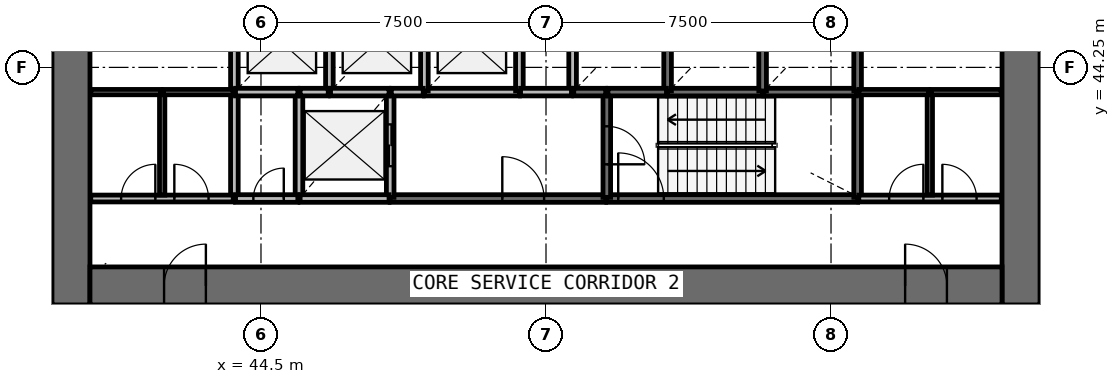
"""IFC4 building model, lengths in metres.
Left out: names, types, materials, properties, quantities, classifications, styles, units other than length and angle.
Written with IfcOpenShell. Run it as: python <this file> out.ifc"""

import sys

from ifc_helpers import new_model, si_unit, direction, frame, frame_2d, origin, place, context, subcontext, project, spatial, rectangle, extrude, source, transform, mapped, element, fill, save


model = new_model("IFC4")
c1 = context("Model", 3, precision=1e-05, world=origin(), true_north=direction((0.0, 1.0)))
c2 = subcontext(c1, "Body", "Model", "MODEL_VIEW")
j1 = project(units=[si_unit("LENGTHUNIT", "METRE"), si_unit("PLANEANGLEUNIT", "RADIAN")], contexts=[c1])
p1 = place(None, origin())
s1 = spatial("IfcSite", under=j1, at=p1, CompositionType="ELEMENT")
p2 = place(p1, origin())
s2 = spatial("IfcBuilding", under=s1, at=p2, CompositionType="ELEMENT")
p3 = place(p2, frame((0.0, 0.0, 62.2)))
s3 = spatial("IfcBuildingStorey", under=s2, at=p3, CompositionType="ELEMENT", Elevation=62.2)
p4 = place(p3, frame((64.5, 38.0, 0.0), z_axis=(0.0, 0.0, 1.0), x_axis=(0.0, 1.0, 0.0)))
e1 = element("IfcWall", 1, at=p4, inside=s3, PredefinedType="SHEAR", context=c2, shape_type="SweptSolid", body=[
    extrude(rectangle(XDim=20.0, YDim=1.0, at=frame_2d((10.0, 0.0))), origin(), (0.0, 0.0, 1.0), 4.4),
])
p5 = place(p4, frame((9.1, 0.0, 0.0)))
e2 = element("IfcOpeningElement", 2, at=p5, cuts=e1, PredefinedType="OPENING", context=c2, shape_type="SweptSolid", body=[
    extrude(rectangle(XDim=1.8, YDim=2.1, at=frame_2d((0.9, 1.05))), frame((0.0, 0.51, 0.0), z_axis=(0.0, -1.0, 0.0), x_axis=(1.0, 0.0, 0.0)), (0.0, 0.0, 1.0), 1.02),
])
p6 = place(p3, frame((39.5, 58.0, 0.0), z_axis=(0.0, 0.0, 1.0), x_axis=(0.0, -1.0, 0.0)))
e3 = element("IfcWall", 3, at=p6, inside=s3, PredefinedType="SHEAR", context=c2, shape_type="SweptSolid", body=[
    extrude(rectangle(XDim=20.0, YDim=1.0, at=frame_2d((10.0, 0.0))), origin(), (0.0, 0.0, 1.0), 4.4),
])
p7 = place(p6, frame((9.1, 0.0, 0.0)))
e4 = element("IfcOpeningElement", 4, at=p7, cuts=e3, PredefinedType="OPENING", context=c2, shape_type="SweptSolid", body=[
    extrude(rectangle(XDim=1.8, YDim=2.1, at=frame_2d((0.9, 1.05))), frame((0.0, 0.51, 0.0), z_axis=(0.0, -1.0, 0.0), x_axis=(1.0, 0.0, 0.0)), (0.0, 0.0, 1.0), 1.02),
])
p8 = place(p3, frame((40.0, 38.5, 0.0), z_axis=(0.0, 0.0, 1.0), x_axis=(1.0, 0.0, 0.0)))
e5 = element("IfcWall", 5, at=p8, inside=s3, PredefinedType="SHEAR", context=c2, shape_type="SweptSolid", body=[
    extrude(rectangle(XDim=24.0, YDim=1.0, at=frame_2d((12.0, 0.0))), origin(), (0.0, 0.0, 1.0), 4.4),
])
p9 = place(p8, frame((21.45, 0.0, 0.0)))
e6 = element("IfcOpeningElement", 6, at=p9, cuts=e5, PredefinedType="OPENING", context=c2, shape_type="SweptSolid", body=[
    extrude(rectangle(XDim=1.1, YDim=2.1, at=frame_2d((0.55, 1.05))), frame((0.0, 0.51, 0.0), z_axis=(0.0, -1.0, 0.0), x_axis=(1.0, 0.0, 0.0)), (0.0, 0.0, 1.0), 1.02),
])
p10 = place(p8, frame((1.95, 0.0, 0.0)))
e7 = element("IfcOpeningElement", 7, at=p10, cuts=e5, PredefinedType="OPENING", context=c2, shape_type="SweptSolid", body=[
    extrude(rectangle(XDim=1.1, YDim=2.1, at=frame_2d((0.55, 1.05))), frame((0.0, 0.51, 0.0), z_axis=(0.0, -1.0, 0.0), x_axis=(1.0, 0.0, 0.0)), (0.0, 0.0, 1.0), 1.02),
])
p11 = place(p3, frame((53.6, 40.8, 0.0), z_axis=(0.0, 0.0, 1.0), x_axis=(1.0, 0.0, 0.0)))
e8 = element("IfcWall", 8, at=p11, inside=s3, PredefinedType="SOLIDWALL", context=c2, shape_type="SweptSolid", body=[
    extrude(rectangle(XDim=6.6, YDim=0.2, at=frame_2d((3.3, 0.0))), origin(), (0.0, 0.0, 1.0), 3.95),
])
p12 = place(p11, frame((0.3, 0.0, 0.0)))
e9 = element("IfcOpeningElement", 9, at=p12, cuts=e8, PredefinedType="OPENING", context=c2, shape_type="SweptSolid", body=[
    extrude(rectangle(XDim=1.2, YDim=2.1, at=frame_2d((0.6, 1.05))), frame((0.0, 0.11, 0.0), z_axis=(0.0, -1.0, 0.0), x_axis=(1.0, 0.0, 0.0)), (0.0, 0.0, 1.0), 0.22),
])
p13 = place(p3, frame((47.9, 40.8, 0.0), z_axis=(0.0, 0.0, 1.0), x_axis=(1.0, 0.0, 0.0)))
e10 = element("IfcWall", 10, at=p13, inside=s3, PredefinedType="SOLIDWALL", context=c2, shape_type="SweptSolid", body=[
    extrude(rectangle(XDim=5.67, YDim=0.2, at=frame_2d((2.835, 0.0))), origin(), (0.0, 0.0, 1.0), 3.95),
])
p14 = place(p13, frame((2.95, 0.0, 0.0)))
e11 = element("IfcOpeningElement", 11, at=p14, cuts=e10, PredefinedType="OPENING", context=c2, shape_type="SweptSolid", body=[
    extrude(rectangle(XDim=1.1, YDim=2.1, at=frame_2d((0.55, 1.05))), frame((0.0, 0.11, 0.0), z_axis=(0.0, -1.0, 0.0), x_axis=(1.0, 0.0, 0.0)), (0.0, 0.0, 1.0), 0.22),
])
for number, where, z_axis, x_axis in (
    (12, (43.8, 43.6, 0.0), (0.0, 0.0, 1.0), (0.0, -1.0, 0.0)),
    (13, (45.5, 43.6, 0.0), (0.0, 0.0, 1.0), (0.0, -1.0, 0.0)),
):
    element("IfcWall", number, at=place(p3, frame(where, z_axis=z_axis, x_axis=x_axis)), inside=s3, PredefinedType="SOLIDWALL", context=c2, shape_type="SweptSolid", body=[
        extrude(rectangle(XDim=2.8, YDim=0.2, at=frame_2d((1.4, 0.0))), origin(), (0.0, 0.0, 1.0), 3.95),
    ])
p15 = place(p3, frame((47.9, 40.83, 0.0), z_axis=(0.0, 0.0, 1.0), x_axis=(0.0, 1.0, 0.0)))
e14 = element("IfcWall", 14, at=p15, inside=s3, PredefinedType="SOLIDWALL", context=c2, shape_type="SweptSolid", body=[
    extrude(rectangle(XDim=2.77, YDim=0.2, at=frame_2d((1.385, 0.0))), origin(), (0.0, 0.0, 1.0), 3.95),
])
p16 = place(p15, frame((0.82, 0.0, 0.0)))
e15 = element("IfcOpeningElement", 15, at=p16, cuts=e14, PredefinedType="OPENING", context=c2, shape_type="SweptSolid", body=[
    extrude(rectangle(XDim=1.1, YDim=2.1, at=frame_2d((0.55, 1.05))), frame((0.0, 0.11, 0.0), z_axis=(0.0, -1.0, 0.0), x_axis=(1.0, 0.0, 0.0)), (0.0, 0.0, 1.0), 0.22),
])
p17 = place(p3, frame((60.2, 40.83, 0.0), z_axis=(0.0, 0.0, 1.0), x_axis=(0.0, 1.0, 0.0)))
e16 = element("IfcWall", 16, at=p17, inside=s3, PredefinedType="SOLIDWALL", context=c2, shape_type="SweptSolid", body=[
    extrude(rectangle(XDim=2.77, YDim=0.2, at=frame_2d((1.385, 0.0))), origin(), (0.0, 0.0, 1.0), 3.95),
])
p18 = place(p3, frame((53.6, 43.6, 0.0), z_axis=(0.0, 0.0, 1.0), x_axis=(0.0, -1.0, 0.0)))
e17 = element("IfcWall", 17, at=p18, inside=s3, PredefinedType="SOLIDWALL", context=c2, shape_type="SweptSolid", body=[
    extrude(rectangle(XDim=2.77, YDim=0.2, at=frame_2d((1.385, 0.0))), origin(), (0.0, 0.0, 1.0), 3.95),
])
p19 = place(p18, frame((0.9, 0.0, 0.0)))
e18 = element("IfcOpeningElement", 18, at=p19, cuts=e17, PredefinedType="OPENING", context=c2, shape_type="SweptSolid", body=[
    extrude(rectangle(XDim=1.0, YDim=2.1, at=frame_2d((0.5, 1.05))), frame((0.0, 0.11, 0.0), z_axis=(0.0, -1.0, 0.0), x_axis=(1.0, 0.0, 0.0)), (0.0, 0.0, 1.0), 0.22),
])
for number, where, z_axis, x_axis in (
    (19, (48.8, 43.6, 0.0), (0.0, 0.0, 1.0), (1.0, 0.0, 0.0)),
    (20, (55.2, 43.6, 0.0), (0.0, 0.0, 1.0), (1.0, 0.0, 0.0)),
):
    element("IfcWall", number, at=place(p3, frame(where, z_axis=z_axis, x_axis=x_axis)), inside=s3, PredefinedType="SOLIDWALL", context=c2, shape_type="SweptSolid", body=[
        extrude(rectangle(XDim=2.5, YDim=0.2, at=frame_2d((1.25, 0.0))), origin(), (0.0, 0.0, 1.0), 3.95),
    ])
p20 = place(p3, frame((57.73, 43.6, 0.0), z_axis=(0.0, 0.0, 1.0), x_axis=(1.0, 0.0, 0.0)))
e21 = element("IfcWall", 21, at=p20, inside=s3, PredefinedType="SOLIDWALL", context=c2, shape_type="SweptSolid", body=[
    extrude(rectangle(XDim=2.44, YDim=0.2, at=frame_2d((1.22, 0.0))), origin(), (0.0, 0.0, 1.0), 3.95),
])
p21 = place(p3, frame((45.53, 40.8, 0.0), z_axis=(0.0, 0.0, 1.0), x_axis=(1.0, 0.0, 0.0)))
e22 = element("IfcWall", 22, at=p21, inside=s3, PredefinedType="SOLIDWALL", context=c2, shape_type="SweptSolid", body=[
    extrude(rectangle(XDim=2.34, YDim=0.2, at=frame_2d((1.17, 0.0))), origin(), (0.0, 0.0, 1.0), 3.95),
])
p22 = place(p3, frame((43.8, 45.99, 0.0), z_axis=(0.0, 0.0, 1.0), x_axis=(0.0, -1.0, 0.0)))
e23 = element("IfcWall", 23, at=p22, inside=s3, PredefinedType="SOLIDWALL", context=c2, shape_type="SweptSolid", body=[
    extrude(rectangle(XDim=2.36, YDim=0.2, at=frame_2d((1.18, 0.0))), origin(), (0.0, 0.0, 1.0), 3.95),
])
p23 = place(p3, frame((46.3, 43.6, 0.0), z_axis=(0.0, 0.0, 1.0), x_axis=(0.0, 1.0, 0.0)))
e24 = element("IfcWall", 24, at=p23, inside=s3, PredefinedType="SOLIDWALL", context=c2, shape_type="SweptSolid", body=[
    extrude(rectangle(XDim=2.39, YDim=0.2, at=frame_2d((1.195, 0.0))), origin(), (0.0, 0.0, 1.0), 3.95),
])
for number, where, z_axis, x_axis in (
    (25, (48.8, 43.63, 0.0), (0.0, 0.0, 1.0), (0.0, 1.0, 0.0)),
    (26, (51.3, 43.63, 0.0), (0.0, 0.0, 1.0), (0.0, 1.0, 0.0)),
):
    element("IfcWall", number, at=place(p3, frame(where, z_axis=z_axis, x_axis=x_axis)), inside=s3, PredefinedType="SOLIDWALL", context=c2, shape_type="SweptSolid", body=[
        extrude(rectangle(XDim=2.36, YDim=0.2, at=frame_2d((1.18, 0.0))), origin(), (0.0, 0.0, 1.0), 3.95),
    ])
p24 = place(p3, frame((52.7, 45.99, 0.0), z_axis=(0.0, 0.0, 1.0), x_axis=(0.0, -1.0, 0.0)))
e27 = element("IfcWall", 27, at=p24, inside=s3, PredefinedType="SOLIDWALL", context=c2, shape_type="SweptSolid", body=[
    extrude(rectangle(XDim=2.39, YDim=0.2, at=frame_2d((1.195, 0.0))), origin(), (0.0, 0.0, 1.0), 3.95),
])
for number, where, z_axis, x_axis in (
    (28, (55.2, 43.63, 0.0), (0.0, 0.0, 1.0), (0.0, 1.0, 0.0)),
    (29, (57.7, 43.63, 0.0), (0.0, 0.0, 1.0), (0.0, 1.0, 0.0)),
    (30, (60.2, 43.63, 0.0), (0.0, 0.0, 1.0), (0.0, 1.0, 0.0)),
):
    element("IfcWall", number, at=place(p3, frame(where, z_axis=z_axis, x_axis=x_axis)), inside=s3, PredefinedType="SOLIDWALL", context=c2, shape_type="SweptSolid", body=[
        extrude(rectangle(XDim=2.36, YDim=0.2, at=frame_2d((1.18, 0.0))), origin(), (0.0, 0.0, 1.0), 3.95),
    ])
p25 = place(p3, frame((43.83, 43.6, 0.0), z_axis=(0.0, 0.0, 1.0), x_axis=(1.0, 0.0, 0.0)))
e31 = element("IfcWall", 31, at=p25, inside=s3, PredefinedType="SOLIDWALL", context=c2, shape_type="SweptSolid", body=[
    extrude(rectangle(XDim=1.64, YDim=0.2, at=frame_2d((0.82, 0.0))), origin(), (0.0, 0.0, 1.0), 3.95),
])
p26 = place(p3, frame((43.83, 40.8, 0.0), z_axis=(0.0, 0.0, 1.0), x_axis=(1.0, 0.0, 0.0)))
e32 = element("IfcWall", 32, at=p26, inside=s3, PredefinedType="SOLIDWALL", context=c2, shape_type="SweptSolid", body=[
    extrude(rectangle(XDim=1.64, YDim=0.2, at=frame_2d((0.82, 0.0))), origin(), (0.0, 0.0, 1.0), 3.95),
])
p27 = place(p26, frame((0.47, 0.0, 0.0)))
e33 = element("IfcOpeningElement", 33, at=p27, cuts=e32, PredefinedType="OPENING", context=c2, shape_type="SweptSolid", body=[
    extrude(rectangle(XDim=0.8, YDim=2.1, at=frame_2d((0.4, 1.05))), frame((0.0, 0.11, 0.0), z_axis=(0.0, -1.0, 0.0), x_axis=(1.0, 0.0, 0.0)), (0.0, 0.0, 1.0), 0.22),
])
for number, where, z_axis, x_axis in (
    (34, (46.33, 43.6, 0.0), (0.0, 0.0, 1.0), (1.0, 0.0, 0.0)),
    (35, (53.63, 43.6, 0.0), (0.0, 0.0, 1.0), (1.0, 0.0, 0.0)),
):
    element("IfcWall", number, at=place(p3, frame(where, z_axis=z_axis, x_axis=x_axis)), inside=s3, PredefinedType="SOLIDWALL", context=c2, shape_type="SweptSolid", body=[
        extrude(rectangle(XDim=1.54, YDim=0.2, at=frame_2d((0.77, 0.0))), origin(), (0.0, 0.0, 1.0), 3.95),
    ])
p28 = place(p3, frame((52.67, 43.6, 0.0), z_axis=(0.0, 0.0, 1.0), x_axis=(-1.0, 0.0, 0.0)))
e36 = element("IfcWall", 36, at=p28, inside=s3, PredefinedType="SOLIDWALL", context=c2, shape_type="SweptSolid", body=[
    extrude(rectangle(XDim=1.34, YDim=0.2, at=frame_2d((0.67, 0.0))), origin(), (0.0, 0.0, 1.0), 3.95),
])
for number, where, z_axis, x_axis in (
    (37, (47.93, 43.6, 0.0), (0.0, 0.0, 1.0), (1.0, 0.0, 0.0)),
    (38, (52.73, 43.6, 0.0), (0.0, 0.0, 1.0), (1.0, 0.0, 0.0)),
):
    element("IfcWall", number, at=place(p3, frame(where, z_axis=z_axis, x_axis=x_axis)), inside=s3, PredefinedType="SOLIDWALL", context=c2, shape_type="SweptSolid", body=[
        extrude(rectangle(XDim=0.84, YDim=0.2, at=frame_2d((0.42, 0.0))), origin(), (0.0, 0.0, 1.0), 3.95),
    ])
p29 = place(p3, frame((45.53, 43.6, 0.0), z_axis=(0.0, 0.0, 1.0), x_axis=(1.0, 0.0, 0.0)))
e39 = element("IfcWall", 39, at=p29, inside=s3, PredefinedType="SOLIDWALL", context=c2, shape_type="SweptSolid", body=[
    extrude(rectangle(XDim=0.74, YDim=0.2, at=frame_2d((0.37, 0.0))), origin(), (0.0, 0.0, 1.0), 3.95),
])
p30 = place(p3, frame((40.02, 40.8, 0.0), z_axis=(0.0, 0.0, 1.0), x_axis=(1.0, 0.0, 0.0)))
e40 = element("IfcWall", 40, at=p30, inside=s3, PredefinedType="PARTITIONING", context=c2, shape_type="SweptSolid", body=[
    extrude(rectangle(XDim=3.75, YDim=0.18, at=frame_2d((1.875, 0.0))), origin(), (0.0, 0.0, 1.0), 3.95),
])
p31 = place(p30, frame((0.8, 0.0, 0.0)))
e41 = element("IfcOpeningElement", 41, at=p31, cuts=e40, PredefinedType="OPENING", context=c2, shape_type="SweptSolid", body=[
    extrude(rectangle(XDim=0.9, YDim=2.1, at=frame_2d((0.45, 1.05))), frame((0.0, 0.1, 0.0), z_axis=(0.0, -1.0, 0.0), x_axis=(1.0, 0.0, 0.0)), (0.0, 0.0, 1.0), 0.2),
])
p32 = place(p30, frame((2.2, 0.0, 0.0)))
e42 = element("IfcOpeningElement", 42, at=p32, cuts=e40, PredefinedType="OPENING", context=c2, shape_type="SweptSolid", body=[
    extrude(rectangle(XDim=0.9, YDim=2.1, at=frame_2d((0.45, 1.05))), frame((0.0, 0.1, 0.0), z_axis=(0.0, -1.0, 0.0), x_axis=(1.0, 0.0, 0.0)), (0.0, 0.0, 1.0), 0.2),
])
p33 = place(p3, frame((60.23, 40.8, 0.0), z_axis=(0.0, 0.0, 1.0), x_axis=(1.0, 0.0, 0.0)))
e43 = element("IfcWall", 43, at=p33, inside=s3, PredefinedType="PARTITIONING", context=c2, shape_type="SweptSolid", body=[
    extrude(rectangle(XDim=3.75, YDim=0.18, at=frame_2d((1.875, 0.0))), origin(), (0.0, 0.0, 1.0), 3.95),
])
p34 = place(p33, frame((0.8, 0.0, 0.0)))
e44 = element("IfcOpeningElement", 44, at=p34, cuts=e43, PredefinedType="OPENING", context=c2, shape_type="SweptSolid", body=[
    extrude(rectangle(XDim=0.9, YDim=2.1, at=frame_2d((0.45, 1.05))), frame((0.0, 0.1, 0.0), z_axis=(0.0, -1.0, 0.0), x_axis=(1.0, 0.0, 0.0)), (0.0, 0.0, 1.0), 0.2),
])
p35 = place(p33, frame((2.2, 0.0, 0.0)))
e45 = element("IfcOpeningElement", 45, at=p35, cuts=e43, PredefinedType="OPENING", context=c2, shape_type="SweptSolid", body=[
    extrude(rectangle(XDim=0.9, YDim=2.1, at=frame_2d((0.45, 1.05))), frame((0.0, 0.1, 0.0), z_axis=(0.0, -1.0, 0.0), x_axis=(1.0, 0.0, 0.0)), (0.0, 0.0, 1.0), 0.2),
])
for number, where, z_axis, x_axis in (
    (46, (41.9, 40.89, 0.0), (0.0, 0.0, 1.0), (0.0, 1.0, 0.0)),
    (47, (62.1, 40.89, 0.0), (0.0, 0.0, 1.0), (0.0, 1.0, 0.0)),
):
    element("IfcWall", number, at=place(p3, frame(where, z_axis=z_axis, x_axis=x_axis)), inside=s3, PredefinedType="PARTITIONING", context=c2, shape_type="SweptSolid", body=[
        extrude(rectangle(XDim=2.71, YDim=0.14, at=frame_2d((1.355, 0.0))), origin(), (0.0, 0.0, 1.0), 3.05),
    ])
for number, where, z_axis, x_axis in (
    (48, (43.77, 43.6, 0.0), (0.0, 0.0, 1.0), (-1.0, 0.0, 0.0)),
    (49, (60.23, 43.6, 0.0), (0.0, 0.0, 1.0), (1.0, 0.0, 0.0)),
):
    element("IfcWall", number, at=place(p3, frame(where, z_axis=z_axis, x_axis=x_axis)), inside=s3, PredefinedType="PARTITIONING", context=c2, shape_type="SweptSolid", body=[
        extrude(rectangle(XDim=1.84, YDim=0.14, at=frame_2d((0.92, 0.0))), origin(), (0.0, 0.0, 1.0), 3.05),
    ])
for number, where, z_axis, x_axis in (
    (50, (41.87, 43.6, 0.0), (0.0, 0.0, 1.0), (-1.0, 0.0, 0.0)),
    (51, (62.13, 43.6, 0.0), (0.0, 0.0, 1.0), (1.0, 0.0, 0.0)),
):
    element("IfcWall", number, at=place(p3, frame(where, z_axis=z_axis, x_axis=x_axis)), inside=s3, PredefinedType="PARTITIONING", context=c2, shape_type="SweptSolid", body=[
        extrude(rectangle(XDim=1.85, YDim=0.14, at=frame_2d((0.925, 0.0))), origin(), (0.0, 0.0, 1.0), 3.05),
    ])
m1 = source(origin(), c2, "Body", "SweptSolid", [
    extrude(rectangle(XDim=1.1, YDim=2.1, at=frame_2d((0.55, 1.05))), frame((0.0, 0.025, 0.0), z_axis=(0.0, -1.0, 0.0), x_axis=(1.0, 0.0, 0.0)), (0.0, 0.0, 1.0), 0.05),
])
p36 = place(p16, origin())
e52 = element("IfcDoor", 52, at=p36, inside=s3, OperationType="DOUBLE_DOOR_SLIDING", PredefinedType="USERDEFINED", context=c2, shape_type="MappedRepresentation", body=[
    mapped(m1, transform((0.0, 0.0, 0.0), scale=1.0)),
])
fill(e15, e52)
m2 = source(origin(), c2, "Body", "SweptSolid", [
    extrude(rectangle(XDim=1.2, YDim=2.1, at=frame_2d((0.6, 1.05))), frame((0.0, 0.025, 0.0), z_axis=(0.0, -1.0, 0.0), x_axis=(1.0, 0.0, 0.0)), (0.0, 0.0, 1.0), 0.05),
])
p37 = place(p12, origin())
e53 = element("IfcDoor", 53, at=p37, inside=s3, OperationType="SINGLE_SWING_LEFT", PredefinedType="DOOR", context=c2, shape_type="MappedRepresentation", body=[
    mapped(m2, transform((0.0, 0.0, 0.0), scale=1.0)),
])
fill(e9, e53)
m3 = source(origin(), c2, "Body", "SweptSolid", [
    extrude(rectangle(XDim=1.0, YDim=2.1, at=frame_2d((0.5, 1.05))), frame((0.0, 0.025, 0.0), z_axis=(0.0, -1.0, 0.0), x_axis=(1.0, 0.0, 0.0)), (0.0, 0.0, 1.0), 0.05),
])
p38 = place(p19, origin())
e54 = element("IfcDoor", 54, at=p38, inside=s3, OperationType="SINGLE_SWING_RIGHT", PredefinedType="DOOR", context=c2, shape_type="MappedRepresentation", body=[
    mapped(m3, transform((0.0, 0.0, 0.0), scale=1.0)),
])
fill(e18, e54)
m4 = source(origin(), c2, "Body", "SweptSolid", [
    extrude(rectangle(XDim=1.1, YDim=2.1, at=frame_2d((0.55, 1.05))), frame((0.0, 0.025, 0.0), z_axis=(0.0, -1.0, 0.0), x_axis=(1.0, 0.0, 0.0)), (0.0, 0.0, 1.0), 0.05),
])
p39 = place(p14, origin())
e55 = element("IfcDoor", 55, at=p39, inside=s3, OperationType="SINGLE_SWING_LEFT", PredefinedType="DOOR", context=c2, shape_type="MappedRepresentation", body=[
    mapped(m4, transform((0.0, 0.0, 0.0), scale=1.0)),
])
fill(e11, e55)
m5 = source(origin(), c2, "Body", "SweptSolid", [
    extrude(rectangle(XDim=0.8, YDim=2.1, at=frame_2d((0.4, 1.05))), frame((0.0, 0.025, 0.0), z_axis=(0.0, -1.0, 0.0), x_axis=(1.0, 0.0, 0.0)), (0.0, 0.0, 1.0), 0.05),
])
p40 = place(p27, origin())
e56 = element("IfcDoor", 56, at=p40, inside=s3, OperationType="SINGLE_SWING_RIGHT", PredefinedType="DOOR", context=c2, shape_type="MappedRepresentation", body=[
    mapped(m5, transform((0.0, 0.0, 0.0), scale=1.0)),
])
fill(e33, e56)
m6 = source(origin(), c2, "Body", "SweptSolid", [
    extrude(rectangle(XDim=1.1, YDim=2.1, at=frame_2d((0.55, 1.05))), frame((0.0, 0.025, 0.0), z_axis=(0.0, -1.0, 0.0), x_axis=(1.0, 0.0, 0.0)), (0.0, 0.0, 1.0), 0.05),
])
p41 = place(p9, origin())
e57 = element("IfcDoor", 57, at=p41, inside=s3, OperationType="SINGLE_SWING_LEFT", PredefinedType="DOOR", context=c2, shape_type="MappedRepresentation", body=[
    mapped(m6, transform((0.0, 0.0, 0.0), scale=1.0)),
])
fill(e6, e57)
p42 = place(p10, origin())
e58 = element("IfcDoor", 58, at=p42, inside=s3, OperationType="SINGLE_SWING_RIGHT", PredefinedType="DOOR", context=c2, shape_type="MappedRepresentation", body=[
    mapped(m6, transform((0.0, 0.0, 0.0), scale=1.0)),
])
fill(e7, e58)
m7 = source(origin(), c2, "Body", "SweptSolid", [
    extrude(rectangle(XDim=0.9, YDim=2.1, at=frame_2d((0.45, 1.05))), frame((0.0, 0.025, 0.0), z_axis=(0.0, -1.0, 0.0), x_axis=(1.0, 0.0, 0.0)), (0.0, 0.0, 1.0), 0.05),
])
p43 = place(p31, origin())
e59 = element("IfcDoor", 59, at=p43, inside=s3, OperationType="SINGLE_SWING_RIGHT", PredefinedType="DOOR", context=c2, shape_type="MappedRepresentation", body=[
    mapped(m7, transform((0.0, 0.0, 0.0), scale=1.0)),
])
fill(e41, e59)
p44 = place(p32, origin())
e60 = element("IfcDoor", 60, at=p44, inside=s3, OperationType="SINGLE_SWING_LEFT", PredefinedType="DOOR", context=c2, shape_type="MappedRepresentation", body=[
    mapped(m7, transform((0.0, 0.0, 0.0), scale=1.0)),
])
fill(e42, e60)
p45 = place(p34, origin())
e61 = element("IfcDoor", 61, at=p45, inside=s3, OperationType="SINGLE_SWING_RIGHT", PredefinedType="DOOR", context=c2, shape_type="MappedRepresentation", body=[
    mapped(m7, transform((0.0, 0.0, 0.0), scale=1.0)),
])
fill(e44, e61)
p46 = place(p35, origin())
e62 = element("IfcDoor", 62, at=p46, inside=s3, OperationType="SINGLE_SWING_LEFT", PredefinedType="DOOR", context=c2, shape_type="MappedRepresentation", body=[
    mapped(m7, transform((0.0, 0.0, 0.0), scale=1.0)),
])
fill(e45, e62)
save(model, sys.argv[1])
